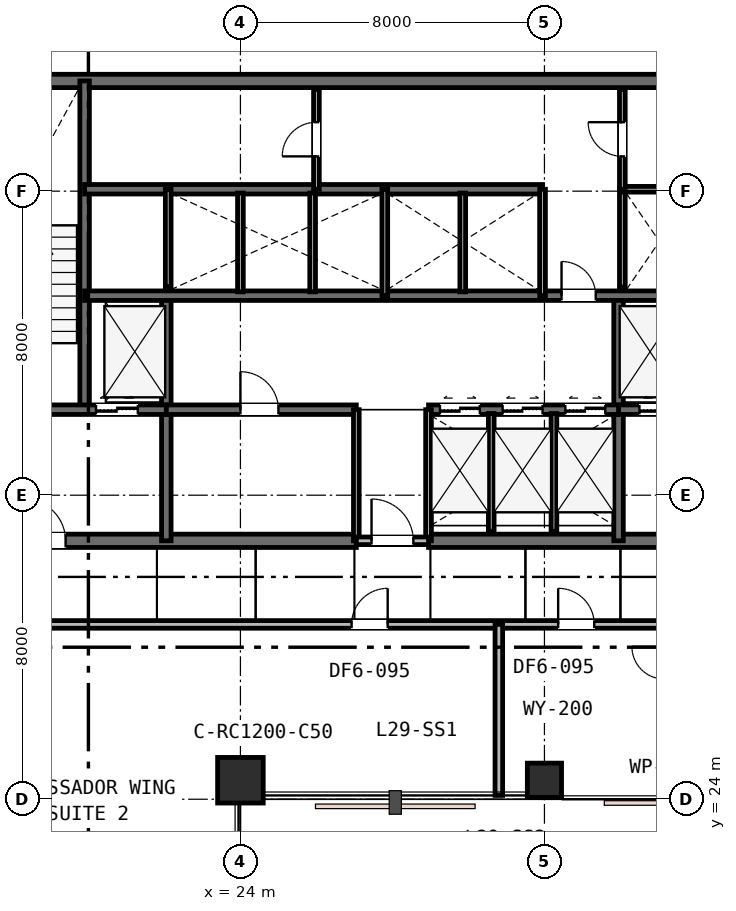
"""IFC4 building model, lengths in metres.
Left out: names, types, materials, properties, quantities, classifications, styles, units other than length and angle.
Written with IfcOpenShell. Run it as: python <this file> out.ifc"""

import sys

from ifc_helpers import new_model, si_unit, direction, frame, frame_2d, origin, origin_2d, place, context, subcontext, project, spatial, rectangle, extrude, element, fill, save


model = new_model("IFC4")
c1 = context("Model", 3, precision=1e-05, world=origin(), true_north=direction((0.0, 1.0)))
c2 = subcontext(c1, "Body", "Model", "MODEL_VIEW")
j1 = project(units=[si_unit("LENGTHUNIT", "METRE"), si_unit("PLANEANGLEUNIT", "RADIAN")], contexts=[c1])
p1 = place(None, origin())
s1 = spatial("IfcSite", under=j1, at=p1, CompositionType="ELEMENT")
p2 = place(p1, origin())
s2 = spatial("IfcBuilding", under=s1, at=p2, CompositionType="ELEMENT")
p3 = place(p2, frame((0.0, 0.0, 115.2)))
s3 = spatial("IfcBuildingStorey", under=s2, at=p3, CompositionType="ELEMENT", Elevation=115.2)
p4 = place(p3, frame((15.85, 42.9, 0.0), z_axis=(0.0, 0.0, 1.0), x_axis=(1.0, 0.0, 0.0)))
e1 = element("IfcWall", 1, at=p4, inside=s3, PredefinedType="SHEAR", context=c2, shape_type="SweptSolid", body=[
    extrude(rectangle(XDim=24.3, YDim=0.35, at=frame_2d((12.15, 0.0))), origin(), (0.0, 0.0, 1.0), 3.6),
])
p5 = place(p3, frame((15.85, 30.8, 0.0), z_axis=(0.0, 0.0, 1.0), x_axis=(1.0, 0.0, 0.0)))
e2 = element("IfcWall", 2, at=p5, inside=s3, PredefinedType="SHEAR", context=c2, shape_type="SweptSolid", body=[
    extrude(rectangle(XDim=11.2, YDim=0.35, at=frame_2d((5.6, 0.0))), origin(), (0.0, 0.0, 1.0), 3.6),
])
p6 = place(p5, frame((2.45, 0.0, 0.0)))
e3 = element("IfcOpeningElement", 3, at=p6, cuts=e2, PredefinedType="OPENING", context=c2, shape_type="SweptSolid", body=[
    extrude(rectangle(XDim=1.1, YDim=2.15, at=frame_2d((0.55, 1.075))), frame((0.0, 0.185, 0.0), z_axis=(0.0, -1.0, 0.0), x_axis=(1.0, 0.0, 0.0)), (0.0, 0.0, 1.0), 0.37),
])
p7 = place(p3, frame((28.95, 30.8, 0.0), z_axis=(0.0, 0.0, 1.0), x_axis=(1.0, 0.0, 0.0)))
e4 = element("IfcWall", 4, at=p7, inside=s3, PredefinedType="SHEAR", context=c2, shape_type="SweptSolid", body=[
    extrude(rectangle(XDim=11.2, YDim=0.35, at=frame_2d((5.6, 0.0))), origin(), (0.0, 0.0, 1.0), 3.6),
])
p8 = place(p7, frame((7.65, 0.0, 0.0)))
e5 = element("IfcOpeningElement", 5, at=p8, cuts=e4, PredefinedType="OPENING", context=c2, shape_type="SweptSolid", body=[
    extrude(rectangle(XDim=1.1, YDim=2.15, at=frame_2d((0.55, 1.075))), frame((0.0, 0.185, 0.0), z_axis=(0.0, -1.0, 0.0), x_axis=(1.0, 0.0, 0.0)), (0.0, 0.0, 1.0), 0.37),
])
p9 = place(p3, frame((19.9, 34.25, 0.0), z_axis=(0.0, 0.0, 1.0), x_axis=(0.0, 1.0, 0.0)))
e6 = element("IfcWall", 6, at=p9, inside=s3, PredefinedType="SHEAR", context=c2, shape_type="SweptSolid", body=[
    extrude(rectangle(XDim=8.65, YDim=0.25, at=frame_2d((4.325, 0.0))), origin(), (0.0, 0.0, 1.0), 3.6),
])
for number, where, z_axis, x_axis in (
    (7, (22.05, 30.8, 0.0), (0.0, 0.0, 1.0), (0.0, 1.0, 0.0)),
    (8, (33.95, 30.8, 0.0), (0.0, 0.0, 1.0), (0.0, 1.0, 0.0)),
):
    element("IfcWall", number, at=place(p3, frame(where, z_axis=z_axis, x_axis=x_axis)), inside=s3, PredefinedType="SHEAR", context=c2, shape_type="SweptSolid", body=[
        extrude(rectangle(XDim=6.45, YDim=0.25, at=frame_2d((3.225, 0.0))), origin(), (0.0, 0.0, 1.0), 3.6),
    ])
p10 = place(p3, frame((16.0, 34.25, 0.0), z_axis=(0.0, 0.0, 1.0), x_axis=(1.0, 0.0, 0.0)))
e9 = element("IfcWall", 9, at=p10, inside=s3, PredefinedType="SHEAR", context=c2, shape_type="SweptSolid", body=[
    extrude(rectangle(XDim=6.05, YDim=0.25, at=frame_2d((3.025, 0.0))), origin(), (0.0, 0.0, 1.0), 3.6),
])
p11 = place(p10, frame((1.25, 0.0, 0.0)))
e10 = element("IfcOpeningElement", 10, at=p11, cuts=e9, PredefinedType="OPENING", context=c2, shape_type="SweptSolid", body=[
    extrude(rectangle(XDim=1.0, YDim=2.15, at=frame_2d((0.5, 1.075))), frame((0.0, 0.135, 0.0), z_axis=(0.0, -1.0, 0.0), x_axis=(1.0, 0.0, 0.0)), (0.0, 0.0, 1.0), 0.27),
])
p12 = place(p10, frame((4.2, 0.0, 0.0)))
e11 = element("IfcOpeningElement", 11, at=p12, cuts=e9, PredefinedType="OPENING", context=c2, shape_type="SweptSolid", body=[
    extrude(rectangle(XDim=1.1, YDim=2.15, at=frame_2d((0.55, 1.075))), frame((0.0, 0.135, 0.0), z_axis=(0.0, -1.0, 0.0), x_axis=(1.0, 0.0, 0.0)), (0.0, 0.0, 1.0), 0.27),
])
p13 = place(p3, frame((33.95, 34.25, 0.0), z_axis=(0.0, 0.0, 1.0), x_axis=(1.0, 0.0, 0.0)))
e12 = element("IfcWall", 12, at=p13, inside=s3, PredefinedType="SHEAR", context=c2, shape_type="SweptSolid", body=[
    extrude(rectangle(XDim=6.05, YDim=0.25, at=frame_2d((3.025, 0.0))), origin(), (0.0, 0.0, 1.0), 3.6),
])
p14 = place(p13, frame((3.7, 0.0, 0.0)))
e13 = element("IfcOpeningElement", 13, at=p14, cuts=e12, PredefinedType="OPENING", context=c2, shape_type="SweptSolid", body=[
    extrude(rectangle(XDim=1.0, YDim=2.15, at=frame_2d((0.5, 1.075))), frame((0.0, 0.135, 0.0), z_axis=(0.0, -1.0, 0.0), x_axis=(1.0, 0.0, 0.0)), (0.0, 0.0, 1.0), 0.27),
])
p15 = place(p13, frame((0.55, 0.0, 0.0)))
e14 = element("IfcOpeningElement", 14, at=p15, cuts=e12, PredefinedType="OPENING", context=c2, shape_type="SweptSolid", body=[
    extrude(rectangle(XDim=1.1, YDim=2.15, at=frame_2d((0.55, 1.075))), frame((0.0, 0.135, 0.0), z_axis=(0.0, -1.0, 0.0), x_axis=(1.0, 0.0, 0.0)), (0.0, 0.0, 1.0), 0.27),
])
p16 = place(p3, frame((22.05, 34.25, 0.0), z_axis=(0.0, 0.0, 1.0), x_axis=(1.0, 0.0, 0.0)))
e15 = element("IfcWall", 15, at=p16, inside=s3, PredefinedType="SHEAR", context=c2, shape_type="SweptSolid", body=[
    extrude(rectangle(XDim=5.0, YDim=0.25, at=frame_2d((2.5, 0.0))), origin(), (0.0, 0.0, 1.0), 3.6),
])
p17 = place(p16, frame((1.95, 0.0, 0.0)))
e16 = element("IfcOpeningElement", 16, at=p17, cuts=e15, PredefinedType="OPENING", context=c2, shape_type="SweptSolid", body=[
    extrude(rectangle(XDim=1.0, YDim=2.15, at=frame_2d((0.5, 1.075))), frame((0.0, 0.135, 0.0), z_axis=(0.0, -1.0, 0.0), x_axis=(1.0, 0.0, 0.0)), (0.0, 0.0, 1.0), 0.27),
])
p18 = place(p3, frame((28.95, 34.25, 0.0), z_axis=(0.0, 0.0, 1.0), x_axis=(1.0, 0.0, 0.0)))
e17 = element("IfcWall", 17, at=p18, inside=s3, PredefinedType="SHEAR", context=c2, shape_type="SweptSolid", body=[
    extrude(rectangle(XDim=5.0, YDim=0.25, at=frame_2d((2.5, 0.0))), origin(), (0.0, 0.0, 1.0), 3.6),
])
p19 = place(p18, frame((0.3, 0.0, 0.0)))
e18 = element("IfcOpeningElement", 18, at=p19, cuts=e17, PredefinedType="OPENING", context=c2, shape_type="SweptSolid", body=[
    extrude(rectangle(XDim=1.05, YDim=2.15, at=frame_2d((0.525, 1.075))), frame((0.0, 0.135, 0.0), z_axis=(0.0, -1.0, 0.0), x_axis=(1.0, 0.0, 0.0)), (0.0, 0.0, 1.0), 0.27),
])
p20 = place(p18, frame((1.95, 0.0, 0.0)))
e19 = element("IfcOpeningElement", 19, at=p20, cuts=e17, PredefinedType="OPENING", context=c2, shape_type="SweptSolid", body=[
    extrude(rectangle(XDim=1.05, YDim=2.15, at=frame_2d((0.525, 1.075))), frame((0.0, 0.135, 0.0), z_axis=(0.0, -1.0, 0.0), x_axis=(1.0, 0.0, 0.0)), (0.0, 0.0, 1.0), 0.27),
])
p21 = place(p18, frame((3.6, 0.0, 0.0)))
e20 = element("IfcOpeningElement", 20, at=p21, cuts=e17, PredefinedType="OPENING", context=c2, shape_type="SweptSolid", body=[
    extrude(rectangle(XDim=1.05, YDim=2.15, at=frame_2d((0.525, 1.075))), frame((0.0, 0.135, 0.0), z_axis=(0.0, -1.0, 0.0), x_axis=(1.0, 0.0, 0.0)), (0.0, 0.0, 1.0), 0.27),
])
p22 = place(p3, frame((19.9, 37.25, 0.0), z_axis=(0.0, 0.0, 1.0), x_axis=(1.0, 0.0, 0.0)))
e21 = element("IfcWall", 21, at=p22, inside=s3, PredefinedType="SHEAR", context=c2, shape_type="SweptSolid", body=[
    extrude(rectangle(XDim=16.2, YDim=0.25, at=frame_2d((8.1, 0.0))), origin(), (0.0, 0.0, 1.0), 3.6),
])
p23 = place(p22, frame((12.55, 0.0, 0.0)))
e22 = element("IfcOpeningElement", 22, at=p23, cuts=e21, PredefinedType="OPENING", context=c2, shape_type="SweptSolid", body=[
    extrude(rectangle(XDim=0.9, YDim=2.15, at=frame_2d((0.45, 1.075))), frame((0.0, 0.135, 0.0), z_axis=(0.0, -1.0, 0.0), x_axis=(1.0, 0.0, 0.0)), (0.0, 0.0, 1.0), 0.27),
])
p24 = place(p3, frame((19.9, 40.05, 0.0), z_axis=(0.0, 0.0, 1.0), x_axis=(1.0, 0.0, 0.0)))
e23 = element("IfcWall", 23, at=p24, inside=s3, PredefinedType="SHEAR", context=c2, shape_type="SweptSolid", body=[
    extrude(rectangle(XDim=12.05, YDim=0.25, at=frame_2d((6.025, 0.0))), origin(), (0.0, 0.0, 1.0), 3.6),
])
p25 = place(p3, frame((24.0, 24.5, 0.0), z_axis=(0.0, 0.0, 1.0), x_axis=(1.0, 0.0, 0.0)))
e24 = element("IfcColumn", 24, at=p25, inside=s3, PredefinedType="COLUMN", context=c2, shape_type="SweptSolid", body=[
    extrude(rectangle(XDim=1.2, YDim=1.2, at=origin_2d()), origin(), (0.0, 0.0, 1.0), 3.6),
])
p26 = place(p3, frame((32.0, 24.5, 0.0), z_axis=(0.0, 0.0, 1.0), x_axis=(1.0, 0.0, 0.0)))
e25 = element("IfcColumn", 25, at=p26, inside=s3, PredefinedType="COLUMN", context=c2, shape_type="SweptSolid", body=[
    extrude(rectangle(XDim=0.9, YDim=0.9, at=origin_2d()), origin(), (0.0, 0.0, 1.0), 3.6),
])
p27 = place(p3, frame((27.05, 30.8, 0.0), z_axis=(0.0, 0.0, 1.0), x_axis=(0.0, 1.0, 0.0)))
e26 = element("IfcWall", 26, at=p27, inside=s3, PredefinedType="PLUMBINGWALL", context=c2, shape_type="SweptSolid", body=[
    extrude(rectangle(XDim=3.45, YDim=0.15, at=frame_2d((1.725, 0.0))), origin(), (0.0, 0.0, 1.0), 3.01),
])
p28 = place(p3, frame((28.95, 30.8, 0.0), z_axis=(0.0, 0.0, 1.0), x_axis=(0.0, 1.0, 0.0)))
e27 = element("IfcWall", 27, at=p28, inside=s3, PredefinedType="PLUMBINGWALL", context=c2, shape_type="SweptSolid", body=[
    extrude(rectangle(XDim=3.45, YDim=0.15, at=frame_2d((1.725, 0.0))), origin(), (0.0, 0.0, 1.0), 3.33),
])
p29 = place(p3, frame((27.05, 30.8, 0.0), z_axis=(0.0, 0.0, 1.0), x_axis=(1.0, 0.0, 0.0)))
e28 = element("IfcWall", 28, at=p29, inside=s3, PredefinedType="PARTITIONING", context=c2, shape_type="SweptSolid", body=[
    extrude(rectangle(XDim=1.9, YDim=0.2, at=frame_2d((0.95, 0.0))), origin(), (0.0, 0.0, 1.0), 3.01),
])
p30 = place(p29, frame((0.4, 0.0, 0.0)))
e29 = element("IfcOpeningElement", 29, at=p30, cuts=e28, PredefinedType="OPENING", context=c2, shape_type="SweptSolid", body=[
    extrude(rectangle(XDim=1.1, YDim=2.15, at=frame_2d((0.55, 1.075))), frame((0.0, 0.11, 0.0), z_axis=(0.0, -1.0, 0.0), x_axis=(1.0, 0.0, 0.0)), (0.0, 0.0, 1.0), 0.22),
])
for number, where, z_axis, x_axis in (
    (30, (30.6, 31.05, 0.0), (0.0, 0.0, 1.0), (0.0, 1.0, 0.0)),
    (31, (32.25, 31.05, 0.0), (0.0, 0.0, 1.0), (0.0, 1.0, 0.0)),
):
    element("IfcWall", number, at=place(p3, frame(where, z_axis=z_axis, x_axis=x_axis)), inside=s3, PredefinedType="PLUMBINGWALL", context=c2, shape_type="SweptSolid", body=[
        extrude(rectangle(XDim=3.1, YDim=0.15, at=frame_2d((1.55, 0.0))), origin(), (0.0, 0.0, 1.0), 3.33),
    ])
p31 = place(p3, frame((22.1, 37.49, 0.0), z_axis=(0.0, 0.0, 1.0), x_axis=(0.0, 1.0, 0.0)))
e32 = element("IfcWall", 32, at=p31, inside=s3, PredefinedType="PLUMBINGWALL", context=c2, shape_type="SweptSolid", body=[
    extrude(rectangle(XDim=2.56, YDim=0.15, at=frame_2d((1.28, 0.0))), origin(), (0.0, 0.0, 1.0), 3.33),
])
p32 = place(p3, frame((27.8, 37.25, 0.0), z_axis=(0.0, 0.0, 1.0), x_axis=(0.0, 1.0, 0.0)))
e33 = element("IfcWall", 33, at=p32, inside=s3, PredefinedType="PLUMBINGWALL", context=c2, shape_type="SweptSolid", body=[
    extrude(rectangle(XDim=2.8, YDim=0.15, at=frame_2d((1.4, 0.0))), origin(), (0.0, 0.0, 1.0), 3.33),
])
for number, where, z_axis, x_axis in (
    (34, (24.0, 37.35, 0.0), (0.0, 0.0, 1.0), (0.0, 1.0, 0.0)),
    (35, (25.9, 37.35, 0.0), (0.0, 0.0, 1.0), (0.0, 1.0, 0.0)),
):
    element("IfcWall", number, at=place(p3, frame(where, z_axis=z_axis, x_axis=x_axis)), inside=s3, PredefinedType="PLUMBINGWALL", context=c2, shape_type="SweptSolid", body=[
        extrude(rectangle(XDim=2.6, YDim=0.15, at=frame_2d((1.3, 0.0))), origin(), (0.0, 0.0, 1.0), 3.33),
    ])
p33 = place(p3, frame((31.95, 37.25, 0.0), z_axis=(0.0, 0.0, 1.0), x_axis=(0.0, 1.0, 0.0)))
e36 = element("IfcWall", 36, at=p33, inside=s3, PredefinedType="PLUMBINGWALL", context=c2, shape_type="SweptSolid", body=[
    extrude(rectangle(XDim=2.8, YDim=0.15, at=frame_2d((1.4, 0.0))), origin(), (0.0, 0.0, 1.0), 3.33),
])
p34 = place(p3, frame((29.85, 37.35, 0.0), z_axis=(0.0, 0.0, 1.0), x_axis=(0.0, 1.0, 0.0)))
e37 = element("IfcWall", 37, at=p34, inside=s3, PredefinedType="PLUMBINGWALL", context=c2, shape_type="SweptSolid", body=[
    extrude(rectangle(XDim=2.6, YDim=0.15, at=frame_2d((1.3, 0.0))), origin(), (0.0, 0.0, 1.0), 3.33),
])
p35 = place(p3, frame((34.05, 37.473, 0.0), z_axis=(0.0, 0.0, 1.0), x_axis=(0.0, 1.0, 0.0)))
e38 = element("IfcWall", 38, at=p35, inside=s3, PredefinedType="PLUMBINGWALL", context=c2, shape_type="SweptSolid", body=[
    extrude(rectangle(XDim=2.577, YDim=0.15, at=frame_2d((1.288, 0.0))), origin(), (0.0, 0.0, 1.0), 3.33),
])
p36 = place(p3, frame((34.05, 40.05, 0.0), z_axis=(0.0, 0.0, 1.0), x_axis=(1.0, 0.0, 0.0)))
e39 = element("IfcWall", 39, at=p36, inside=s3, PredefinedType="PARTITIONING", context=c2, shape_type="SweptSolid", body=[
    extrude(rectangle(XDim=2.05, YDim=0.15, at=frame_2d((1.025, 0.0))), origin(), (0.0, 0.0, 1.0), 3.33),
])
p37 = place(p3, frame((34.05, 40.05, 0.0), z_axis=(0.0, 0.0, 1.0), x_axis=(0.0, 1.0, 0.0)))
e40 = element("IfcWall", 40, at=p37, inside=s3, PredefinedType="PARTITIONING", context=c2, shape_type="SweptSolid", body=[
    extrude(rectangle(XDim=2.63, YDim=0.15, at=frame_2d((1.315, 0.0))), origin(), (0.0, 0.0, 1.0), 3.33),
])
p38 = place(p37, frame((0.865, 0.0, 0.0)))
e41 = element("IfcOpeningElement", 41, at=p38, cuts=e40, PredefinedType="OPENING", context=c2, shape_type="SweptSolid", body=[
    extrude(rectangle(XDim=0.9, YDim=2.15, at=frame_2d((0.45, 1.075))), frame((0.0, 0.085, 0.0), z_axis=(0.0, -1.0, 0.0), x_axis=(1.0, 0.0, 0.0)), (0.0, 0.0, 1.0), 0.17),
])
p39 = place(p3, frame((26.0, 40.05, 0.0), z_axis=(0.0, 0.0, 1.0), x_axis=(0.0, 1.0, 0.0)))
e42 = element("IfcWall", 42, at=p39, inside=s3, PredefinedType="PARTITIONING", context=c2, shape_type="SweptSolid", body=[
    extrude(rectangle(XDim=2.63, YDim=0.15, at=frame_2d((1.315, 0.0))), origin(), (0.0, 0.0, 1.0), 3.33),
])
p40 = place(p39, frame((0.865, 0.0, 0.0)))
e43 = element("IfcOpeningElement", 43, at=p40, cuts=e42, PredefinedType="OPENING", context=c2, shape_type="SweptSolid", body=[
    extrude(rectangle(XDim=0.9, YDim=2.15, at=frame_2d((0.45, 1.075))), frame((0.0, 0.085, 0.0), z_axis=(0.0, -1.0, 0.0), x_axis=(1.0, 0.0, 0.0)), (0.0, 0.0, 1.0), 0.17),
])
p41 = place(p3, frame((13.6, 28.6, 0.0), z_axis=(0.0, 0.0, 1.0), x_axis=(1.0, 0.0, 0.0)))
e44 = element("IfcWall", 44, at=p41, inside=s3, PredefinedType="PARTITIONING", context=c2, shape_type="SweptSolid", body=[
    extrude(rectangle(XDim=30.6, YDim=0.2, at=frame_2d((15.3, 0.0))), origin(), (0.0, 0.0, 1.0), 2.87),
])
p42 = place(p41, frame((13.325, 0.0, 0.0)))
e45 = element("IfcOpeningElement", 45, at=p42, cuts=e44, PredefinedType="OPENING", context=c2, shape_type="SweptSolid", body=[
    extrude(rectangle(XDim=0.95, YDim=2.15, at=frame_2d((0.475, 1.075))), frame((0.0, 0.11, 0.0), z_axis=(0.0, -1.0, 0.0), x_axis=(1.0, 0.0, 0.0)), (0.0, 0.0, 1.0), 0.22),
])
p43 = place(p41, frame((18.761, 0.0, 0.0)))
e46 = element("IfcOpeningElement", 46, at=p43, cuts=e44, PredefinedType="OPENING", context=c2, shape_type="SweptSolid", body=[
    extrude(rectangle(XDim=0.95, YDim=2.15, at=frame_2d((0.475, 1.075))), frame((0.0, 0.11, 0.0), z_axis=(0.0, -1.0, 0.0), x_axis=(1.0, 0.0, 0.0)), (0.0, 0.0, 1.0), 0.22),
])
p44 = place(p41, frame((25.503, 0.0, 0.0)))
e47 = element("IfcOpeningElement", 47, at=p44, cuts=e44, PredefinedType="OPENING", context=c2, shape_type="SweptSolid", body=[
    extrude(rectangle(XDim=0.95, YDim=2.15, at=frame_2d((0.475, 1.075))), frame((0.0, 0.11, 0.0), z_axis=(0.0, -1.0, 0.0), x_axis=(1.0, 0.0, 0.0)), (0.0, 0.0, 1.0), 0.22),
])
p45 = place(p3, frame((30.8, 24.1, 0.0), z_axis=(0.0, 0.0, 1.0), x_axis=(0.0, 1.0, 0.0)))
e48 = element("IfcWall", 48, at=p45, inside=s3, PredefinedType="PARTITIONING", context=c2, shape_type="SweptSolid", body=[
    extrude(rectangle(XDim=4.5, YDim=0.2, at=frame_2d((2.25, 0.0))), origin(), (0.0, 0.0, 1.0), 2.96),
])
p46 = place(p30, origin())
e49 = element("IfcDoor", 49, at=p46, inside=s3, OperationType="SINGLE_SWING_LEFT", PredefinedType="DOOR", context=c2, shape_type="SweptSolid", body=[
    extrude(rectangle(XDim=1.1, YDim=2.15, at=frame_2d((0.55, 1.075))), frame((0.0, 0.025, 0.0), z_axis=(0.0, -1.0, 0.0), x_axis=(1.0, 0.0, 0.0)), (0.0, 0.0, 1.0), 0.05),
])
fill(e29, e49)
p47 = place(p6, origin())
e50 = element("IfcDoor", 50, at=p47, inside=s3, OperationType="SINGLE_SWING_LEFT", PredefinedType="DOOR", context=c2, shape_type="SweptSolid", body=[
    extrude(rectangle(XDim=1.1, YDim=2.15, at=frame_2d((0.55, 1.075))), frame((0.0, 0.025, 0.0), z_axis=(0.0, -1.0, 0.0), x_axis=(1.0, 0.0, 0.0)), (0.0, 0.0, 1.0), 0.05),
])
fill(e3, e50)
p48 = place(p17, origin())
e51 = element("IfcDoor", 51, at=p48, inside=s3, OperationType="SINGLE_SWING_LEFT", PredefinedType="DOOR", context=c2, shape_type="SweptSolid", body=[
    extrude(rectangle(XDim=1.0, YDim=2.15, at=frame_2d((0.5, 1.075))), frame((0.0, 0.025, 0.0), z_axis=(0.0, -1.0, 0.0), x_axis=(1.0, 0.0, 0.0)), (0.0, 0.0, 1.0), 0.05),
])
fill(e16, e51)
p49 = place(p23, origin())
e52 = element("IfcDoor", 52, at=p49, inside=s3, OperationType="SINGLE_SWING_LEFT", PredefinedType="DOOR", context=c2, shape_type="SweptSolid", body=[
    extrude(rectangle(XDim=0.9, YDim=2.15, at=frame_2d((0.45, 1.075))), frame((0.0, 0.025, 0.0), z_axis=(0.0, -1.0, 0.0), x_axis=(1.0, 0.0, 0.0)), (0.0, 0.0, 1.0), 0.05),
])
fill(e22, e52)
p50 = place(p38, origin())
e53 = element("IfcDoor", 53, at=p50, inside=s3, OperationType="SINGLE_SWING_RIGHT", PredefinedType="DOOR", context=c2, shape_type="SweptSolid", body=[
    extrude(rectangle(XDim=0.9, YDim=2.15, at=frame_2d((0.45, 1.075))), frame((0.0, 0.025, 0.0), z_axis=(0.0, -1.0, 0.0), x_axis=(1.0, 0.0, 0.0)), (0.0, 0.0, 1.0), 0.05),
])
fill(e41, e53)
p51 = place(p40, origin())
e54 = element("IfcDoor", 54, at=p51, inside=s3, OperationType="SINGLE_SWING_LEFT", PredefinedType="DOOR", context=c2, shape_type="SweptSolid", body=[
    extrude(rectangle(XDim=0.9, YDim=2.15, at=frame_2d((0.45, 1.075))), frame((0.0, 0.025, 0.0), z_axis=(0.0, -1.0, 0.0), x_axis=(1.0, 0.0, 0.0)), (0.0, 0.0, 1.0), 0.05),
])
fill(e43, e54)
p52 = place(p42, origin())
e55 = element("IfcDoor", 55, at=p52, inside=s3, OperationType="SINGLE_SWING_RIGHT", PredefinedType="DOOR", context=c2, shape_type="SweptSolid", body=[
    extrude(rectangle(XDim=0.95, YDim=2.15, at=frame_2d((0.475, 1.075))), frame((0.0, 0.025, 0.0), z_axis=(0.0, -1.0, 0.0), x_axis=(1.0, 0.0, 0.0)), (0.0, 0.0, 1.0), 0.05),
])
fill(e45, e55)
p53 = place(p43, origin())
e56 = element("IfcDoor", 56, at=p53, inside=s3, OperationType="SINGLE_SWING_LEFT", PredefinedType="DOOR", context=c2, shape_type="SweptSolid", body=[
    extrude(rectangle(XDim=0.95, YDim=2.15, at=frame_2d((0.475, 1.075))), frame((0.0, 0.025, 0.0), z_axis=(0.0, -1.0, 0.0), x_axis=(1.0, 0.0, 0.0)), (0.0, 0.0, 1.0), 0.05),
])
fill(e46, e56)
p54 = place(p12, origin())
e57 = element("IfcDoor", 57, at=p54, inside=s3, OperationType="DOUBLE_DOOR_SLIDING", PredefinedType="DOOR", context=c2, shape_type="SweptSolid", body=[
    extrude(rectangle(XDim=1.1, YDim=2.15, at=frame_2d((0.55, 1.075))), frame((0.0, 0.025, 0.0), z_axis=(0.0, -1.0, 0.0), x_axis=(1.0, 0.0, 0.0)), (0.0, 0.0, 1.0), 0.05),
])
fill(e11, e57)
p55 = place(p15, origin())
e58 = element("IfcDoor", 58, at=p55, inside=s3, OperationType="DOUBLE_DOOR_SLIDING", PredefinedType="DOOR", context=c2, shape_type="SweptSolid", body=[
    extrude(rectangle(XDim=1.1, YDim=2.15, at=frame_2d((0.55, 1.075))), frame((0.0, 0.025, 0.0), z_axis=(0.0, -1.0, 0.0), x_axis=(1.0, 0.0, 0.0)), (0.0, 0.0, 1.0), 0.05),
])
fill(e14, e58)
p56 = place(p19, origin())
e59 = element("IfcDoor", 59, at=p56, inside=s3, OperationType="DOUBLE_DOOR_SLIDING", PredefinedType="DOOR", context=c2, shape_type="SweptSolid", body=[
    extrude(rectangle(XDim=1.05, YDim=2.15, at=frame_2d((0.525, 1.075))), frame((0.0, 0.025, 0.0), z_axis=(0.0, -1.0, 0.0), x_axis=(1.0, 0.0, 0.0)), (0.0, 0.0, 1.0), 0.05),
])
fill(e18, e59)
p57 = place(p20, origin())
e60 = element("IfcDoor", 60, at=p57, inside=s3, OperationType="DOUBLE_DOOR_SLIDING", PredefinedType="DOOR", context=c2, shape_type="SweptSolid", body=[
    extrude(rectangle(XDim=1.05, YDim=2.15, at=frame_2d((0.525, 1.075))), frame((0.0, 0.025, 0.0), z_axis=(0.0, -1.0, 0.0), x_axis=(1.0, 0.0, 0.0)), (0.0, 0.0, 1.0), 0.05),
])
fill(e19, e60)
p58 = place(p21, origin())
e61 = element("IfcDoor", 61, at=p58, inside=s3, OperationType="DOUBLE_DOOR_SLIDING", PredefinedType="DOOR", context=c2, shape_type="SweptSolid", body=[
    extrude(rectangle(XDim=1.05, YDim=2.15, at=frame_2d((0.525, 1.075))), frame((0.0, 0.025, 0.0), z_axis=(0.0, -1.0, 0.0), x_axis=(1.0, 0.0, 0.0)), (0.0, 0.0, 1.0), 0.05),
])
fill(e20, e61)
save(model, sys.argv[1])
